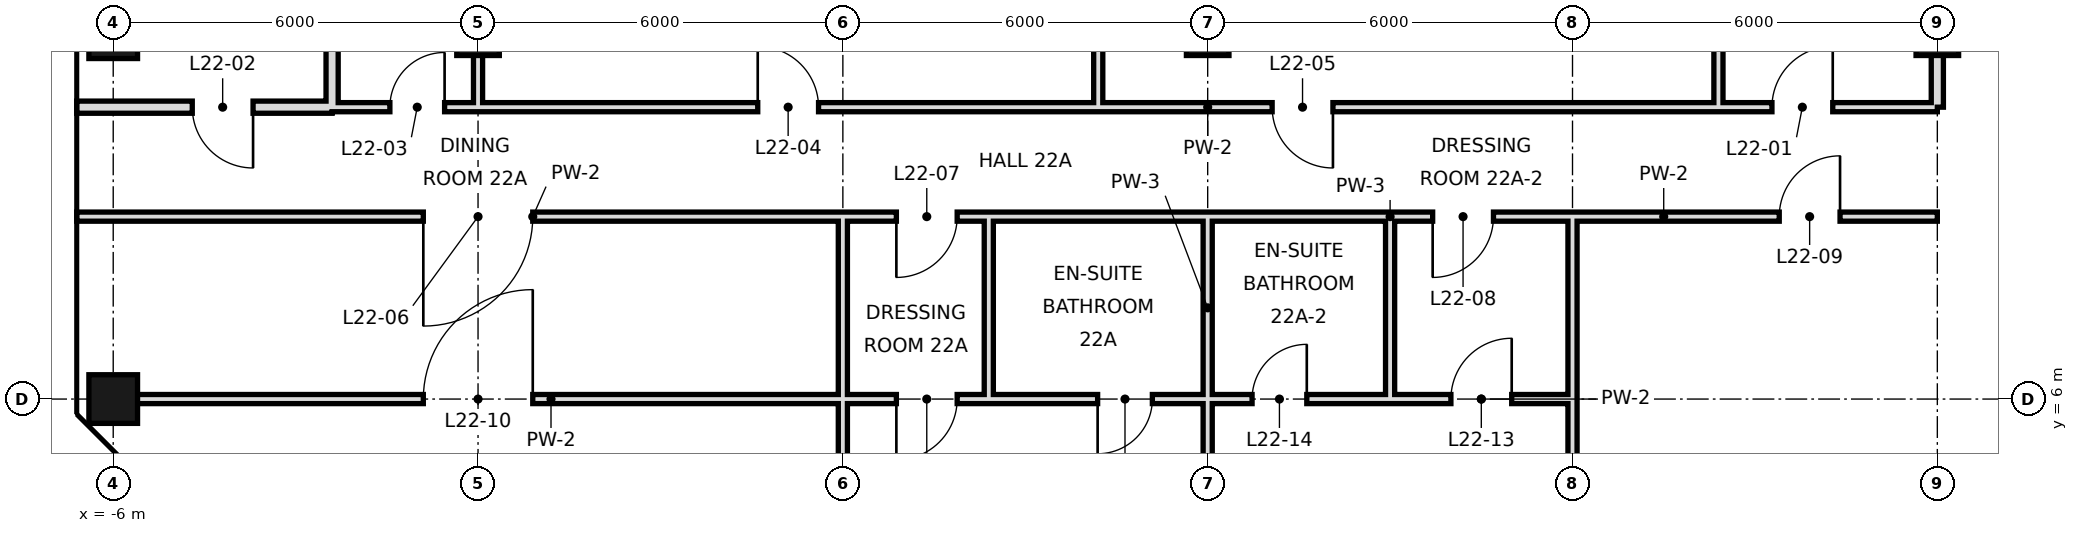
"""IFC4 building model, lengths in metres.
Left out: names, types, materials, properties, quantities, classifications, styles, units other than length and angle.
Written with IfcOpenShell. Run it as: python <this file> out.ifc"""

import sys

from ifc_helpers import new_model, si_unit, direction, frame, frame_2d, origin, origin_2d, place, context, subcontext, project, spatial, rectangle, hollow_rectangle, extrude, element, fill, save


model = new_model("IFC4")
c1 = context("Model", 3, precision=1e-05, world=origin(), true_north=direction((0.0, 1.0)))
c2 = subcontext(c1, "Body", "Model", "MODEL_VIEW")
j1 = project(units=[si_unit("LENGTHUNIT", "METRE"), si_unit("PLANEANGLEUNIT", "RADIAN")], contexts=[c1])
p1 = place(None, origin())
s1 = spatial("IfcSite", under=j1, at=p1, CompositionType="ELEMENT")
p2 = place(p1, origin())
s2 = spatial("IfcBuilding", under=s1, at=p2, CompositionType="ELEMENT")
p3 = place(p2, frame((0.0, 0.0, 103.4)))
s3 = spatial("IfcBuildingStorey", under=s2, at=p3, CompositionType="ELEMENT", Elevation=103.4)
for number, where, z_axis, x_axis in (
    (1, (-6.0, 6.0, 0.0), (0.0, 0.0, 1.0), (1.0, 0.0, 0.0)),
    (2, (-6.0, 12.0, 0.0), (0.0, 0.0, 1.0), (1.0, 0.0, 0.0)),
):
    element("IfcColumn", number, at=place(p3, frame(where, z_axis=z_axis, x_axis=x_axis)), inside=s3, PredefinedType="COLUMN", context=c2, shape_type="SweptSolid", body=[
        extrude(hollow_rectangle(XDim=0.8, YDim=0.8, WallThickness=0.04, at=origin_2d()), origin(), (0.0, 0.0, 1.0), 3.6),
    ])
for number, where, z_axis, x_axis in (
    (3, (0.0, 12.0, 0.0), (0.0, 0.0, 1.0), (1.0, 0.0, 0.0)),
    (4, (12.0, 12.0, 0.0), (0.0, 0.0, 1.0), (1.0, 0.0, 0.0)),
    (5, (24.0, 12.0, 0.0), (0.0, 0.0, 1.0), (1.0, 0.0, 0.0)),
):
    element("IfcColumn", number, at=place(p3, frame(where, z_axis=z_axis, x_axis=x_axis)), inside=s3, PredefinedType="COLUMN", context=c2, shape_type="SweptSolid", body=[
        extrude(hollow_rectangle(XDim=0.7, YDim=0.7, WallThickness=0.036, at=origin_2d()), origin(), (0.0, 0.0, 1.0), 3.6),
    ])
p4 = place(p3, frame((-2.4, 10.8, 0.0), z_axis=(0.0, 0.0, 1.0), x_axis=(0.0, 1.0, 0.0)))
e6 = element("IfcWall", 6, at=p4, inside=s3, PredefinedType="SOLIDWALL", context=c2, shape_type="SweptSolid", body=[
    extrude(rectangle(XDim=7.2, YDim=0.2, at=frame_2d((3.6, 0.0))), origin(), (0.0, 0.0, 1.0), 2.97),
])
p5 = place(p3, frame((0.0, 10.8, 0.0), z_axis=(0.0, 0.0, 1.0), x_axis=(0.0, 1.0, 0.0)))
e7 = element("IfcWall", 7, at=p5, inside=s3, PredefinedType="PARTITIONING", context=c2, shape_type="SweptSolid", body=[
    extrude(rectangle(XDim=7.2, YDim=0.15, at=frame_2d((3.6, 0.0))), origin(), (0.0, 0.0, 1.0), 2.72),
])
p6 = place(p3, frame((10.2, 10.8, 0.0), z_axis=(0.0, 0.0, 1.0), x_axis=(0.0, 1.0, 0.0)))
e8 = element("IfcWall", 8, at=p6, inside=s3, PredefinedType="PARTITIONING", context=c2, shape_type="SweptSolid", body=[
    extrude(rectangle(XDim=7.9, YDim=0.15, at=frame_2d((3.95, 0.0))), origin(), (0.0, 0.0, 1.0), 3.42),
])
p7 = place(p3, frame((12.0, 0.0, 0.0), z_axis=(0.0, 0.0, 1.0), x_axis=(0.0, 1.0, 0.0)))
e9 = element("IfcWall", 9, at=p7, inside=s3, PredefinedType="PARTITIONING", context=c2, shape_type="SweptSolid", body=[
    extrude(rectangle(XDim=6.0, YDim=0.15, at=frame_2d((3.0, 0.0))), origin(), (0.0, 0.0, 1.0), 2.72),
])
p8 = place(p3, frame((12.0, 6.0, 0.0), z_axis=(0.0, 0.0, 1.0), x_axis=(0.0, 1.0, 0.0)))
e10 = element("IfcWall", 10, at=p8, inside=s3, PredefinedType="PARTITIONING", context=c2, shape_type="SweptSolid", body=[
    extrude(rectangle(XDim=3.0, YDim=0.15, at=frame_2d((1.5, 0.0))), origin(), (0.0, 0.0, 1.0), 2.72),
])
p9 = place(p3, frame((15.0, 6.0, 0.0), z_axis=(0.0, 0.0, 1.0), x_axis=(0.0, 1.0, 0.0)))
e11 = element("IfcWall", 11, at=p9, inside=s3, PredefinedType="PARTITIONING", context=c2, shape_type="SweptSolid", body=[
    extrude(rectangle(XDim=3.0, YDim=0.15, at=frame_2d((1.5, 0.0))), origin(), (0.0, 0.0, 1.0), 3.42),
])
p10 = place(p3, frame((18.0, -0.6, 0.0), z_axis=(0.0, 0.0, 1.0), x_axis=(0.0, 1.0, 0.0)))
e12 = element("IfcWall", 12, at=p10, inside=s3, PredefinedType="PARTITIONING", context=c2, shape_type="SweptSolid", body=[
    extrude(rectangle(XDim=9.6, YDim=0.15, at=frame_2d((4.8, 0.0))), origin(), (0.0, 0.0, 1.0), 2.72),
])
p11 = place(p3, frame((20.4, 10.8, 0.0), z_axis=(0.0, 0.0, 1.0), x_axis=(0.0, 1.0, 0.0)))
e13 = element("IfcWall", 13, at=p11, inside=s3, PredefinedType="PARTITIONING", context=c2, shape_type="SweptSolid", body=[
    extrude(rectangle(XDim=7.9, YDim=0.15, at=frame_2d((3.95, 0.0))), origin(), (0.0, 0.0, 1.0), 3.42),
])
p12 = place(p3, frame((24.0, 10.8, 0.0), z_axis=(0.0, 0.0, 1.0), x_axis=(0.0, 1.0, 0.0)))
e14 = element("IfcWall", 14, at=p12, inside=s3, PredefinedType="SOLIDWALL", context=c2, shape_type="SweptSolid", body=[
    extrude(rectangle(XDim=7.9, YDim=0.2, at=frame_2d((3.95, 0.0))), origin(), (0.0, 0.0, 1.0), 2.72),
])
p13 = place(p3, frame((6.0, -0.6, 0.0), z_axis=(0.0, 0.0, 1.0), x_axis=(0.0, 1.0, 0.0)))
e15 = element("IfcWall", 15, at=p13, inside=s3, PredefinedType="PARTITIONING", context=c2, shape_type="SweptSolid", body=[
    extrude(rectangle(XDim=9.6, YDim=0.15, at=frame_2d((4.8, 0.0))), origin(), (0.0, 0.0, 1.0), 2.72),
])
p14 = place(p3, frame((8.4, 6.0, 0.0), z_axis=(0.0, 0.0, 1.0), x_axis=(0.0, 1.0, 0.0)))
e16 = element("IfcWall", 16, at=p14, inside=s3, PredefinedType="PARTITIONING", context=c2, shape_type="SweptSolid", body=[
    extrude(rectangle(XDim=3.0, YDim=0.15, at=frame_2d((1.5, 0.0))), origin(), (0.0, 0.0, 1.0), 3.42),
])
p15 = place(p3, frame((-6.6, 10.8, 0.0), z_axis=(0.0, 0.0, 1.0), x_axis=(1.0, 0.0, 0.0)))
e17 = element("IfcWall", 17, at=p15, inside=s3, PredefinedType="SOLIDWALL", context=c2, shape_type="SweptSolid", body=[
    extrude(rectangle(XDim=4.2, YDim=0.2, at=frame_2d((2.1, 0.0))), origin(), (0.0, 0.0, 1.0), 2.97),
])
p16 = place(p15, frame((1.9, 0.0, 0.0)))
e18 = element("IfcOpeningElement", 18, at=p16, cuts=e17, PredefinedType="OPENING", context=c2, shape_type="SweptSolid", body=[
    extrude(rectangle(XDim=1.0, YDim=2.4, at=frame_2d((0.5, 1.2))), frame((0.0, 0.11, 0.0), z_axis=(0.0, -1.0, 0.0), x_axis=(1.0, 0.0, 0.0)), (0.0, 0.0, 1.0), 0.22),
])
p17 = place(p3, frame((0.0, 10.8, 0.0), z_axis=(0.0, 0.0, 1.0), x_axis=(1.0, 0.0, 0.0)))
e19 = element("IfcWall", 19, at=p17, inside=s3, PredefinedType="PARTITIONING", context=c2, shape_type="SweptSolid", body=[
    extrude(rectangle(XDim=24.0, YDim=0.15, at=frame_2d((12.0, 0.0))), origin(), (0.0, 0.0, 1.0), 3.42),
])
p18 = place(p17, frame((21.28, 0.0, 0.0)))
e20 = element("IfcOpeningElement", 20, at=p18, cuts=e19, PredefinedType="OPENING", context=c2, shape_type="SweptSolid", body=[
    extrude(rectangle(XDim=1.0, YDim=2.4, at=frame_2d((0.5, 1.2))), frame((0.0, 0.085, 0.0), z_axis=(0.0, -1.0, 0.0), x_axis=(1.0, 0.0, 0.0)), (0.0, 0.0, 1.0), 0.17),
])
p19 = place(p17, frame((4.6, 0.0, 0.0)))
e21 = element("IfcOpeningElement", 21, at=p19, cuts=e19, PredefinedType="OPENING", context=c2, shape_type="SweptSolid", body=[
    extrude(rectangle(XDim=1.0, YDim=2.4, at=frame_2d((0.5, 1.2))), frame((0.0, 0.085, 0.0), z_axis=(0.0, -1.0, 0.0), x_axis=(1.0, 0.0, 0.0)), (0.0, 0.0, 1.0), 0.17),
])
p20 = place(p17, frame((13.06, 0.0, 0.0)))
e22 = element("IfcOpeningElement", 22, at=p20, cuts=e19, PredefinedType="OPENING", context=c2, shape_type="SweptSolid", body=[
    extrude(rectangle(XDim=1.0, YDim=2.4, at=frame_2d((0.5, 1.2))), frame((0.0, 0.085, 0.0), z_axis=(0.0, -1.0, 0.0), x_axis=(1.0, 0.0, 0.0)), (0.0, 0.0, 1.0), 0.17),
])
p21 = place(p3, frame((-2.4, 10.8, 0.0), z_axis=(0.0, 0.0, 1.0), x_axis=(1.0, 0.0, 0.0)))
e23 = element("IfcWall", 23, at=p21, inside=s3, PredefinedType="PARTITIONING", context=c2, shape_type="SweptSolid", body=[
    extrude(rectangle(XDim=2.4, YDim=0.15, at=frame_2d((1.2, 0.0))), origin(), (0.0, 0.0, 1.0), 3.42),
])
p22 = place(p21, frame((0.95, 0.0, 0.0)))
e24 = element("IfcOpeningElement", 24, at=p22, cuts=e23, PredefinedType="OPENING", context=c2, shape_type="SweptSolid", body=[
    extrude(rectangle(XDim=0.9, YDim=2.4, at=frame_2d((0.45, 1.2))), frame((0.0, 0.085, 0.0), z_axis=(0.0, -1.0, 0.0), x_axis=(1.0, 0.0, 0.0)), (0.0, 0.0, 1.0), 0.17),
])
p23 = place(p3, frame((-6.0, 6.0, 0.0), z_axis=(0.0, 0.0, 1.0), x_axis=(1.0, 0.0, 0.0)))
e25 = element("IfcWall", 25, at=p23, inside=s3, PredefinedType="PARTITIONING", context=c2, shape_type="SweptSolid", body=[
    extrude(rectangle(XDim=14.4, YDim=0.15, at=frame_2d((7.2, 0.0))), origin(), (0.0, 0.0, 1.0), 2.97),
])
p24 = place(p23, frame((5.1, 0.0, 0.0)))
e26 = element("IfcOpeningElement", 26, at=p24, cuts=e25, PredefinedType="OPENING", context=c2, shape_type="SweptSolid", body=[
    extrude(rectangle(XDim=1.8, YDim=2.4, at=frame_2d((0.9, 1.2))), frame((0.0, 0.085, 0.0), z_axis=(0.0, -1.0, 0.0), x_axis=(1.0, 0.0, 0.0)), (0.0, 0.0, 1.0), 0.17),
])
p25 = place(p23, frame((12.88, 0.0, 0.0)))
e27 = element("IfcOpeningElement", 27, at=p25, cuts=e25, PredefinedType="OPENING", context=c2, shape_type="SweptSolid", body=[
    extrude(rectangle(XDim=1.0, YDim=2.4, at=frame_2d((0.5, 1.2))), frame((0.0, 0.085, 0.0), z_axis=(0.0, -1.0, 0.0), x_axis=(1.0, 0.0, 0.0)), (0.0, 0.0, 1.0), 0.17),
])
p26 = place(p3, frame((15.0, 6.0, 0.0), z_axis=(0.0, 0.0, 1.0), x_axis=(1.0, 0.0, 0.0)))
e28 = element("IfcWall", 28, at=p26, inside=s3, PredefinedType="PARTITIONING", context=c2, shape_type="SweptSolid", body=[
    extrude(rectangle(XDim=3.0, YDim=0.15, at=frame_2d((1.5, 0.0))), origin(), (0.0, 0.0, 1.0), 2.97),
])
p27 = place(p26, frame((1.0, 0.0, 0.0)))
e29 = element("IfcOpeningElement", 29, at=p27, cuts=e28, PredefinedType="OPENING", context=c2, shape_type="SweptSolid", body=[
    extrude(rectangle(XDim=1.0, YDim=2.4, at=frame_2d((0.5, 1.2))), frame((0.0, 0.085, 0.0), z_axis=(0.0, -1.0, 0.0), x_axis=(1.0, 0.0, 0.0)), (0.0, 0.0, 1.0), 0.17),
])
p28 = place(p3, frame((8.4, 6.0, 0.0), z_axis=(0.0, 0.0, 1.0), x_axis=(1.0, 0.0, 0.0)))
e30 = element("IfcWall", 30, at=p28, inside=s3, PredefinedType="PARTITIONING", context=c2, shape_type="SweptSolid", body=[
    extrude(rectangle(XDim=6.6, YDim=0.15, at=frame_2d((3.3, 0.0))), origin(), (0.0, 0.0, 1.0), 2.97),
])
p29 = place(p28, frame((1.79, 0.0, 0.0)))
e31 = element("IfcOpeningElement", 31, at=p29, cuts=e30, PredefinedType="OPENING", context=c2, shape_type="SweptSolid", body=[
    extrude(rectangle(XDim=0.9, YDim=2.4, at=frame_2d((0.45, 1.2))), frame((0.0, 0.085, 0.0), z_axis=(0.0, -1.0, 0.0), x_axis=(1.0, 0.0, 0.0)), (0.0, 0.0, 1.0), 0.17),
])
p30 = place(p28, frame((4.33, 0.0, 0.0)))
e32 = element("IfcOpeningElement", 32, at=p30, cuts=e30, PredefinedType="OPENING", context=c2, shape_type="SweptSolid", body=[
    extrude(rectangle(XDim=0.9, YDim=2.4, at=frame_2d((0.45, 1.2))), frame((0.0, 0.085, 0.0), z_axis=(0.0, -1.0, 0.0), x_axis=(1.0, 0.0, 0.0)), (0.0, 0.0, 1.0), 0.17),
])
p31 = place(p3, frame((-6.6, 9.0, 0.0), z_axis=(0.0, 0.0, 1.0), x_axis=(1.0, 0.0, 0.0)))
e33 = element("IfcWall", 33, at=p31, inside=s3, PredefinedType="PARTITIONING", context=c2, shape_type="SweptSolid", body=[
    extrude(rectangle(XDim=15.0, YDim=0.15, at=frame_2d((7.5, 0.0))), origin(), (0.0, 0.0, 1.0), 3.42),
])
p32 = place(p31, frame((5.7, 0.0, 0.0)))
e34 = element("IfcOpeningElement", 34, at=p32, cuts=e33, PredefinedType="OPENING", context=c2, shape_type="SweptSolid", body=[
    extrude(rectangle(XDim=1.8, YDim=2.4, at=frame_2d((0.9, 1.2))), frame((0.0, 0.085, 0.0), z_axis=(0.0, -1.0, 0.0), x_axis=(1.0, 0.0, 0.0)), (0.0, 0.0, 1.0), 0.17),
])
p33 = place(p31, frame((13.48, 0.0, 0.0)))
e35 = element("IfcOpeningElement", 35, at=p33, cuts=e33, PredefinedType="OPENING", context=c2, shape_type="SweptSolid", body=[
    extrude(rectangle(XDim=1.0, YDim=2.4, at=frame_2d((0.5, 1.2))), frame((0.0, 0.085, 0.0), z_axis=(0.0, -1.0, 0.0), x_axis=(1.0, 0.0, 0.0)), (0.0, 0.0, 1.0), 0.17),
])
p34 = place(p3, frame((15.0, 9.0, 0.0), z_axis=(0.0, 0.0, 1.0), x_axis=(1.0, 0.0, 0.0)))
e36 = element("IfcWall", 36, at=p34, inside=s3, PredefinedType="PARTITIONING", context=c2, shape_type="SweptSolid", body=[
    extrude(rectangle(XDim=9.0, YDim=0.15, at=frame_2d((4.5, 0.0))), origin(), (0.0, 0.0, 1.0), 3.42),
])
p35 = place(p34, frame((0.7, 0.0, 0.0)))
e37 = element("IfcOpeningElement", 37, at=p35, cuts=e36, PredefinedType="OPENING", context=c2, shape_type="SweptSolid", body=[
    extrude(rectangle(XDim=1.0, YDim=2.4, at=frame_2d((0.5, 1.2))), frame((0.0, 0.085, 0.0), z_axis=(0.0, -1.0, 0.0), x_axis=(1.0, 0.0, 0.0)), (0.0, 0.0, 1.0), 0.17),
])
p36 = place(p34, frame((6.4, 0.0, 0.0)))
e38 = element("IfcOpeningElement", 38, at=p36, cuts=e36, PredefinedType="OPENING", context=c2, shape_type="SweptSolid", body=[
    extrude(rectangle(XDim=1.0, YDim=2.4, at=frame_2d((0.5, 1.2))), frame((0.0, 0.085, 0.0), z_axis=(0.0, -1.0, 0.0), x_axis=(1.0, 0.0, 0.0)), (0.0, 0.0, 1.0), 0.17),
])
p37 = place(p3, frame((8.4, 9.0, 0.0), z_axis=(0.0, 0.0, 1.0), x_axis=(1.0, 0.0, 0.0)))
e39 = element("IfcWall", 39, at=p37, inside=s3, PredefinedType="PARTITIONING", context=c2, shape_type="SweptSolid", body=[
    extrude(rectangle(XDim=6.6, YDim=0.15, at=frame_2d((3.3, 0.0))), origin(), (0.0, 0.0, 1.0), 3.42),
])
p38 = place(p18, frame((1.0, 0.0, 0.0), z_axis=(0.0, 0.0, 1.0), x_axis=(-1.0, 0.0, 0.0)))
e40 = element("IfcDoor", 40, at=p38, inside=s3, OperationType="SINGLE_SWING_LEFT", PredefinedType="DOOR", context=c2, shape_type="SweptSolid", body=[
    extrude(rectangle(XDim=1.0, YDim=2.4, at=frame_2d((0.5, 1.2))), frame((0.0, 0.025, 0.0), z_axis=(0.0, -1.0, 0.0), x_axis=(1.0, 0.0, 0.0)), (0.0, 0.0, 1.0), 0.05),
])
fill(e20, e40)
p39 = place(p16, origin())
e41 = element("IfcDoor", 41, at=p39, inside=s3, OperationType="SINGLE_SWING_RIGHT", PredefinedType="DOOR", context=c2, shape_type="SweptSolid", body=[
    extrude(rectangle(XDim=1.0, YDim=2.4, at=frame_2d((0.5, 1.2))), frame((0.0, 0.025, 0.0), z_axis=(0.0, -1.0, 0.0), x_axis=(1.0, 0.0, 0.0)), (0.0, 0.0, 1.0), 0.05),
])
fill(e18, e41)
p40 = place(p22, frame((0.9, 0.0, 0.0), z_axis=(0.0, 0.0, 1.0), x_axis=(-1.0, 0.0, 0.0)))
e42 = element("IfcDoor", 42, at=p40, inside=s3, OperationType="SINGLE_SWING_LEFT", PredefinedType="DOOR", context=c2, shape_type="SweptSolid", body=[
    extrude(rectangle(XDim=0.9, YDim=2.4, at=frame_2d((0.45, 1.2))), frame((0.0, 0.025, 0.0), z_axis=(0.0, -1.0, 0.0), x_axis=(1.0, 0.0, 0.0)), (0.0, 0.0, 1.0), 0.05),
])
fill(e24, e42)
p41 = place(p19, origin())
e43 = element("IfcDoor", 43, at=p41, inside=s3, OperationType="SINGLE_SWING_LEFT", PredefinedType="DOOR", context=c2, shape_type="SweptSolid", body=[
    extrude(rectangle(XDim=1.0, YDim=2.4, at=frame_2d((0.5, 1.2))), frame((0.0, 0.025, 0.0), z_axis=(0.0, -1.0, 0.0), x_axis=(1.0, 0.0, 0.0)), (0.0, 0.0, 1.0), 0.05),
])
fill(e21, e43)
p42 = place(p20, origin())
e44 = element("IfcDoor", 44, at=p42, inside=s3, OperationType="SINGLE_SWING_RIGHT", PredefinedType="DOOR", context=c2, shape_type="SweptSolid", body=[
    extrude(rectangle(XDim=1.0, YDim=2.4, at=frame_2d((0.5, 1.2))), frame((0.0, 0.025, 0.0), z_axis=(0.0, -1.0, 0.0), x_axis=(1.0, 0.0, 0.0)), (0.0, 0.0, 1.0), 0.05),
])
fill(e22, e44)
p43 = place(p32, frame((1.8, 0.0, 0.0), z_axis=(0.0, 0.0, 1.0), x_axis=(-1.0, 0.0, 0.0)))
e45 = element("IfcDoor", 45, at=p43, inside=s3, OperationType="SINGLE_SWING_RIGHT", PredefinedType="DOOR", context=c2, shape_type="SweptSolid", body=[
    extrude(rectangle(XDim=1.8, YDim=2.4, at=frame_2d((0.9, 1.2))), frame((0.0, 0.025, 0.0), z_axis=(0.0, -1.0, 0.0), x_axis=(1.0, 0.0, 0.0)), (0.0, 0.0, 1.0), 0.05),
])
fill(e34, e45)
p44 = place(p33, frame((1.0, 0.0, 0.0), z_axis=(0.0, 0.0, 1.0), x_axis=(-1.0, 0.0, 0.0)))
e46 = element("IfcDoor", 46, at=p44, inside=s3, OperationType="SINGLE_SWING_RIGHT", PredefinedType="DOOR", context=c2, shape_type="SweptSolid", body=[
    extrude(rectangle(XDim=1.0, YDim=2.4, at=frame_2d((0.5, 1.2))), frame((0.0, 0.025, 0.0), z_axis=(0.0, -1.0, 0.0), x_axis=(1.0, 0.0, 0.0)), (0.0, 0.0, 1.0), 0.05),
])
fill(e35, e46)
p45 = place(p35, frame((1.0, 0.0, 0.0), z_axis=(0.0, 0.0, 1.0), x_axis=(-1.0, 0.0, 0.0)))
e47 = element("IfcDoor", 47, at=p45, inside=s3, OperationType="SINGLE_SWING_RIGHT", PredefinedType="DOOR", context=c2, shape_type="SweptSolid", body=[
    extrude(rectangle(XDim=1.0, YDim=2.4, at=frame_2d((0.5, 1.2))), frame((0.0, 0.025, 0.0), z_axis=(0.0, -1.0, 0.0), x_axis=(1.0, 0.0, 0.0)), (0.0, 0.0, 1.0), 0.05),
])
fill(e37, e47)
p46 = place(p36, frame((1.0, 0.0, 0.0), z_axis=(0.0, 0.0, 1.0), x_axis=(-1.0, 0.0, 0.0)))
e48 = element("IfcDoor", 48, at=p46, inside=s3, OperationType="SINGLE_SWING_LEFT", PredefinedType="DOOR", context=c2, shape_type="SweptSolid", body=[
    extrude(rectangle(XDim=1.0, YDim=2.4, at=frame_2d((0.5, 1.2))), frame((0.0, 0.025, 0.0), z_axis=(0.0, -1.0, 0.0), x_axis=(1.0, 0.0, 0.0)), (0.0, 0.0, 1.0), 0.05),
])
fill(e38, e48)
p47 = place(p24, frame((1.8, 0.0, 0.0), z_axis=(0.0, 0.0, 1.0), x_axis=(-1.0, 0.0, 0.0)))
e49 = element("IfcDoor", 49, at=p47, inside=s3, OperationType="SINGLE_SWING_LEFT", PredefinedType="DOOR", context=c2, shape_type="SweptSolid", body=[
    extrude(rectangle(XDim=1.8, YDim=2.4, at=frame_2d((0.9, 1.2))), frame((0.0, 0.025, 0.0), z_axis=(0.0, -1.0, 0.0), x_axis=(1.0, 0.0, 0.0)), (0.0, 0.0, 1.0), 0.05),
])
fill(e26, e49)
p48 = place(p25, frame((1.0, 0.0, 0.0), z_axis=(0.0, 0.0, 1.0), x_axis=(-1.0, 0.0, 0.0)))
e50 = element("IfcDoor", 50, at=p48, inside=s3, OperationType="SINGLE_SWING_RIGHT", PredefinedType="DOOR", context=c2, shape_type="SweptSolid", body=[
    extrude(rectangle(XDim=1.0, YDim=2.4, at=frame_2d((0.5, 1.2))), frame((0.0, 0.025, 0.0), z_axis=(0.0, -1.0, 0.0), x_axis=(1.0, 0.0, 0.0)), (0.0, 0.0, 1.0), 0.05),
])
fill(e27, e50)
p49 = place(p29, frame((0.9, 0.0, 0.0), z_axis=(0.0, 0.0, 1.0), x_axis=(-1.0, 0.0, 0.0)))
e51 = element("IfcDoor", 51, at=p49, inside=s3, OperationType="SINGLE_SWING_RIGHT", PredefinedType="DOOR", context=c2, shape_type="SweptSolid", body=[
    extrude(rectangle(XDim=0.9, YDim=2.4, at=frame_2d((0.45, 1.2))), frame((0.0, 0.025, 0.0), z_axis=(0.0, -1.0, 0.0), x_axis=(1.0, 0.0, 0.0)), (0.0, 0.0, 1.0), 0.05),
])
fill(e31, e51)
p50 = place(p27, frame((1.0, 0.0, 0.0), z_axis=(0.0, 0.0, 1.0), x_axis=(-1.0, 0.0, 0.0)))
e52 = element("IfcDoor", 52, at=p50, inside=s3, OperationType="SINGLE_SWING_LEFT", PredefinedType="DOOR", context=c2, shape_type="SweptSolid", body=[
    extrude(rectangle(XDim=1.0, YDim=2.4, at=frame_2d((0.5, 1.2))), frame((0.0, 0.025, 0.0), z_axis=(0.0, -1.0, 0.0), x_axis=(1.0, 0.0, 0.0)), (0.0, 0.0, 1.0), 0.05),
])
fill(e29, e52)
p51 = place(p30, frame((0.9, 0.0, 0.0), z_axis=(0.0, 0.0, 1.0), x_axis=(-1.0, 0.0, 0.0)))
e53 = element("IfcDoor", 53, at=p51, inside=s3, OperationType="SINGLE_SWING_LEFT", PredefinedType="DOOR", context=c2, shape_type="SweptSolid", body=[
    extrude(rectangle(XDim=0.9, YDim=2.4, at=frame_2d((0.45, 1.2))), frame((0.0, 0.025, 0.0), z_axis=(0.0, -1.0, 0.0), x_axis=(1.0, 0.0, 0.0)), (0.0, 0.0, 1.0), 0.05),
])
fill(e32, e53)
save(model, sys.argv[1])
